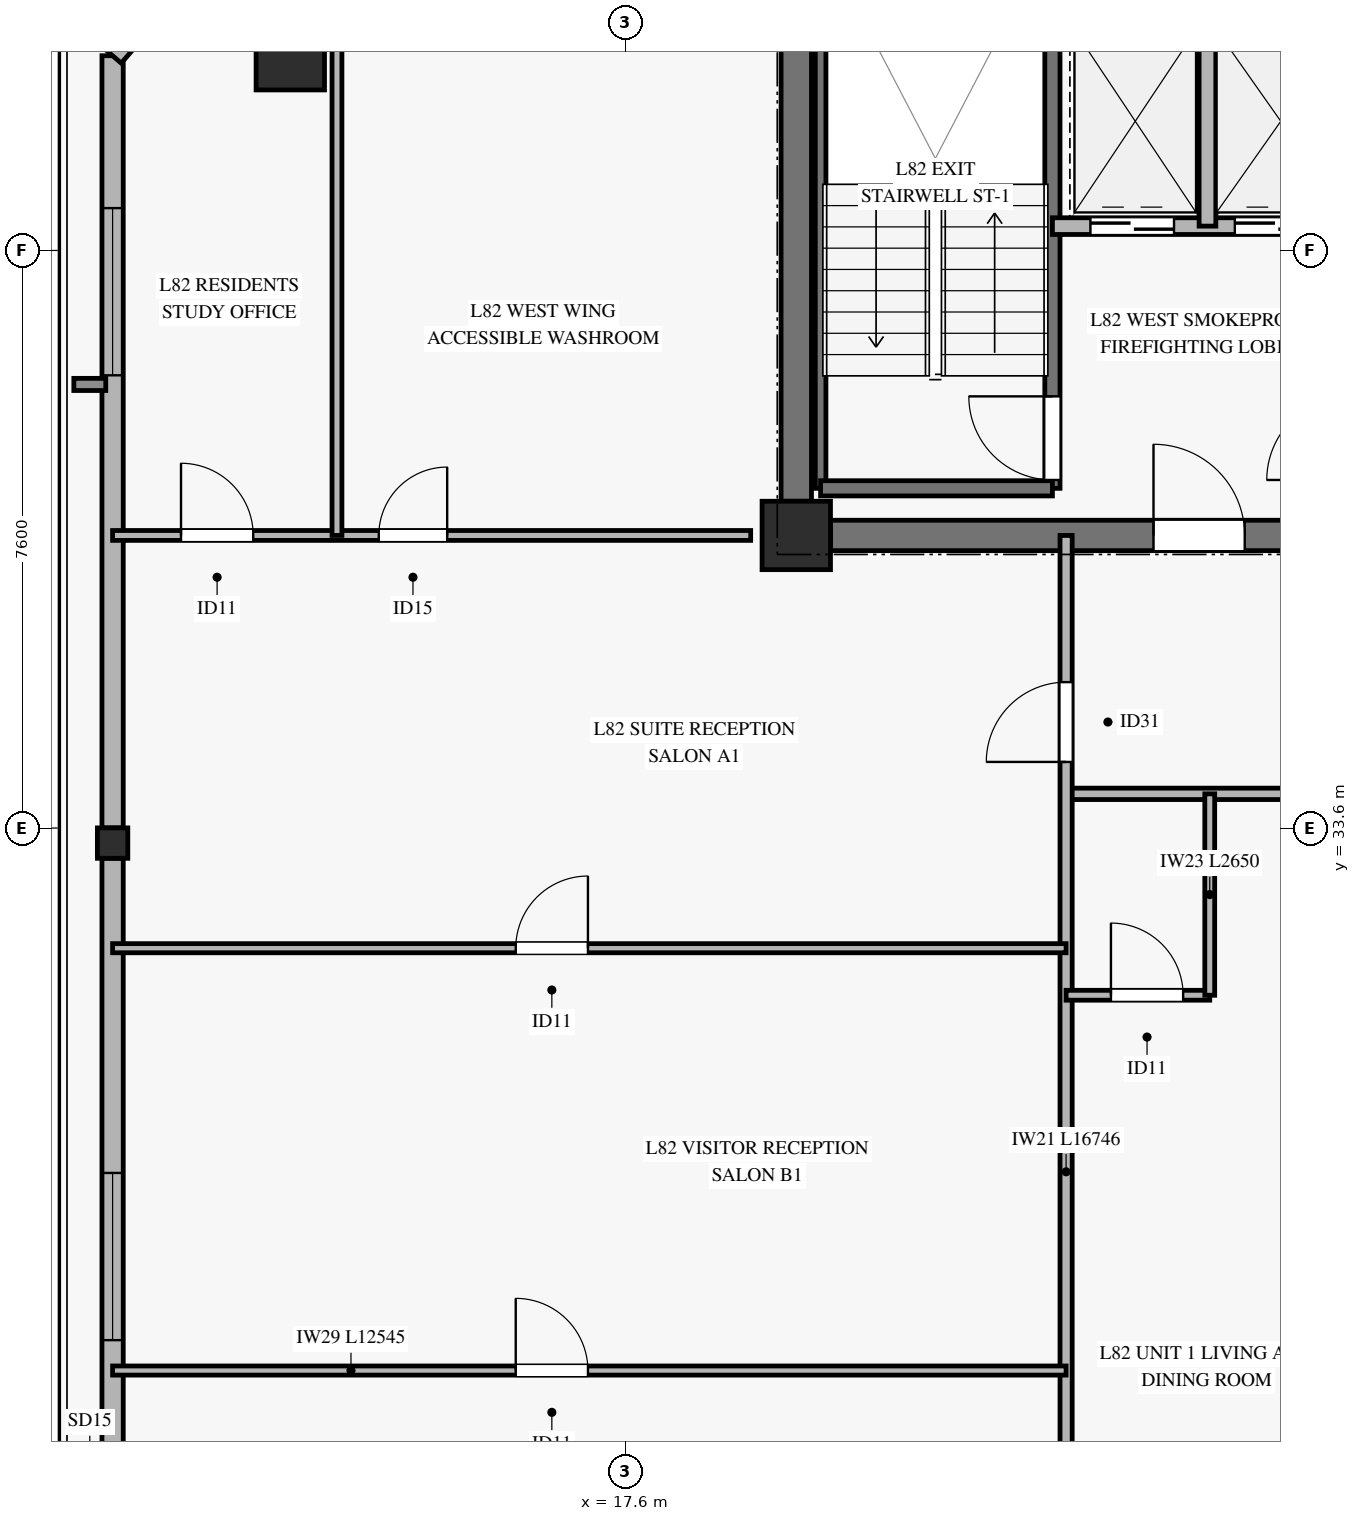
"""IFC4 building model, lengths in metres.
Left out: names, types, materials, properties, quantities, classifications, styles, units other than length and angle.
Written with IfcOpenShell. Run it as: python <this file> out.ifc"""

import sys

from ifc_helpers import new_model, si_unit, direction, frame, frame_2d, origin, origin_2d, place, context, subcontext, project, spatial, rectangle, hollow_rectangle, extrude, source, transform, mapped, element, fill, save


model = new_model("IFC4")
c1 = context("Model", 3, precision=1e-05, world=origin(), true_north=direction((0.0, 1.0)))
c2 = subcontext(c1, "Body", "Model", "MODEL_VIEW")
j1 = project(units=[si_unit("LENGTHUNIT", "METRE"), si_unit("PLANEANGLEUNIT", "RADIAN")], contexts=[c1])
p1 = place(None, origin())
s1 = spatial("IfcSite", under=j1, at=p1, CompositionType="ELEMENT")
p2 = place(p1, origin())
s2 = spatial("IfcBuilding", under=s1, at=p2, CompositionType="ELEMENT")
p3 = place(p2, frame((0.0, 0.0, 317.6)))
s3 = spatial("IfcBuildingStorey", under=s2, at=p3, CompositionType="ELEMENT", Elevation=317.6)
m1 = source(origin(), c2, "Body", "SweptSolid", [
    extrude(rectangle(XDim=0.9, YDim=0.9, at=origin_2d()), origin(), (0.0, 0.0, 1.0), 3.185),
])
p4 = place(p3, frame((19.85, 37.45, 0.0), z_axis=(0.0, 0.0, 1.0), x_axis=(1.0, 0.0, 0.0)))
e1 = element("IfcColumn", 1, at=p4, inside=s3, PredefinedType="PILASTER", context=c2, shape_type="MappedRepresentation", body=[
    mapped(m1, transform((0.0, 0.0, 0.0), x_axis=(1.0, 0.0, 0.0), y_axis=(0.0, 1.0, 0.0), z_axis=(0.0, 0.0, 1.0), scale=1.0)),
])
p5 = place(p3, frame((20.3, 37.45, 0.0), z_axis=(0.0, 0.0, 1.0), x_axis=(1.0, 0.0, 0.0)))
e2 = element("IfcWall", 2, at=p5, inside=s3, PredefinedType="SHEAR", context=c2, shape_type="SweptSolid", body=[
    extrude(rectangle(XDim=10.05, YDim=0.4, at=frame_2d((5.025, 0.0))), origin(), (0.0, 0.0, 1.0), 3.185),
])
p6 = place(p5, frame((4.25, 0.0, 0.0)))
e3 = element("IfcOpeningElement", 3, at=p6, cuts=e2, PredefinedType="OPENING", context=c2, shape_type="SweptSolid", body=[
    extrude(rectangle(XDim=1.2, YDim=2.15, at=frame_2d((0.6, 1.075))), frame((0.0, 0.21, 0.0), z_axis=(0.0, -1.0, 0.0), x_axis=(1.0, 0.0, 0.0)), (0.0, 0.0, 1.0), 0.42),
])
p7 = place(p3, frame((19.85, 37.9, 0.0), z_axis=(0.0, 0.0, 1.0), x_axis=(0.0, 1.0, 0.0)))
e4 = element("IfcWall", 4, at=p7, inside=s3, PredefinedType="SHEAR", context=c2, shape_type="SweptSolid", body=[
    extrude(rectangle(XDim=8.2, YDim=0.4, at=frame_2d((4.1, 0.0))), origin(), (0.0, 0.0, 1.0), 3.185),
])
m2 = source(origin(), c2, "Body", "SweptSolid", [
    extrude(hollow_rectangle(XDim=0.9, YDim=0.9, WallThickness=0.04, at=origin_2d()), origin(), (0.0, 0.0, 1.0), 3.185),
])
p8 = place(p3, frame((13.193, 43.762, 0.0), z_axis=(0.0, 0.0, 1.0), x_axis=(1.0, 0.0, 0.0)))
e5 = element("IfcColumn", 5, at=p8, inside=s3, PredefinedType="COLUMN", context=c2, shape_type="MappedRepresentation", body=[
    mapped(m2, transform((0.0, 0.0, 0.0), x_axis=(1.0, 0.0, 0.0), y_axis=(0.0, 1.0, 0.0), z_axis=(0.0, 0.0, 1.0), scale=1.0)),
])
m3 = source(origin(), c2, "Body", "SweptSolid", [
    extrude(hollow_rectangle(XDim=0.4, YDim=0.4, WallThickness=0.02, at=origin_2d()), origin(), (0.0, 0.0, 1.0), 3.185),
])
p9 = place(p3, frame((10.855, 33.402, 0.0), z_axis=(0.0, 0.0, 1.0), x_axis=(1.0, 0.0, 0.0)))
e6 = element("IfcColumn", 6, at=p9, inside=s3, PredefinedType="COLUMN", context=c2, shape_type="MappedRepresentation", body=[
    mapped(m3, transform((0.0, 0.0, 0.0), x_axis=(1.0, 0.0, 0.0), y_axis=(0.0, 1.0, 0.0), z_axis=(0.0, 0.0, 1.0), scale=1.0)),
])
p10 = place(p3, frame((10.855, 23.042, 0.0), z_axis=(0.0, 0.0, 1.0), x_axis=(0.0, 1.0, 0.0)))
e7 = element("IfcWall", 7, at=p10, inside=s3, PredefinedType="SOLIDWALL", context=c2, shape_type="SweptSolid", body=[
    extrude(rectangle(XDim=10.16, YDim=0.28, at=frame_2d((5.08, 0.0))), origin(), (0.0, 0.0, 1.0), 2.815),
])
p11 = place(p10, frame((3.82, 0.0, 0.45)))
e8 = element("IfcOpeningElement", 8, at=p11, cuts=e7, PredefinedType="OPENING", context=c2, shape_type="SweptSolid", body=[
    extrude(rectangle(XDim=2.2, YDim=2.1, at=frame_2d((1.1, 1.05))), frame((0.0, 0.15, 0.0), z_axis=(0.0, -1.0, 0.0), x_axis=(1.0, 0.0, 0.0)), (0.0, 0.0, 1.0), 0.3),
])
p12 = place(p3, frame((10.855, 33.602, 0.0), z_axis=(0.0, 0.0, 1.0), x_axis=(0.0, 1.0, 0.0)))
e9 = element("IfcWall", 9, at=p12, inside=s3, PredefinedType="SOLIDWALL", context=c2, shape_type="SweptSolid", body=[
    extrude(rectangle(XDim=10.16, YDim=0.28, at=frame_2d((5.08, 0.0))), origin(), (0.0, 0.0, 1.0), 2.815),
])
p13 = place(p12, frame((5.955, 0.0, 0.45)))
e10 = element("IfcOpeningElement", 10, at=p13, cuts=e9, PredefinedType="OPENING", context=c2, shape_type="SweptSolid", body=[
    extrude(rectangle(XDim=2.2, YDim=2.1, at=frame_2d((1.1, 1.05))), frame((0.0, 0.15, 0.0), z_axis=(0.0, -1.0, 0.0), x_axis=(1.0, 0.0, 0.0)), (0.0, 0.0, 1.0), 0.3),
])
p14 = place(p3, frame((12.993, 46.25, 0.0), z_axis=(0.0, 0.0, 1.0), x_axis=(-0.65172861611, -0.758452246977, 0.0)))
e11 = element("IfcWall", 11, at=p14, inside=s3, PredefinedType="SOLIDWALL", context=c2, shape_type="SweptSolid", body=[
    extrude(rectangle(XDim=3.281, YDim=0.3, at=frame_2d((1.64, 0.0))), origin(), (0.0, 0.0, 1.0), 2.815),
])
p15 = place(p14, frame((0.84, 0.0, 0.45)))
e12 = element("IfcOpeningElement", 12, at=p15, cuts=e11, PredefinedType="OPENING", context=c2, shape_type="SweptSolid", body=[
    extrude(rectangle(XDim=1.6, YDim=2.0, at=frame_2d((0.8, 1.0))), frame((0.0, 0.16, 0.0), z_axis=(0.0, -1.0, 0.0), x_axis=(1.0, 0.0, 0.0)), (0.0, 0.0, 1.0), 0.32),
])
p16 = place(p3, frame((20.17, 38.07, 0.0), z_axis=(0.0, 0.0, 1.0), x_axis=(0.0, 1.0, 0.0)))
e13 = element("IfcWall", 13, at=p16, inside=s3, PredefinedType="SOLIDWALL", context=c2, shape_type="SweptSolid", body=[
    extrude(rectangle(XDim=7.25, YDim=0.14, at=frame_2d((3.625, 0.0))), origin(), (0.0, 0.0, 1.0), 3.4),
])
p17 = place(p3, frame((23.22, 38.07, 0.0), z_axis=(0.0, 0.0, 1.0), x_axis=(0.0, 1.0, 0.0)))
e14 = element("IfcWall", 14, at=p17, inside=s3, PredefinedType="SOLIDWALL", context=c2, shape_type="SweptSolid", body=[
    extrude(rectangle(XDim=7.25, YDim=0.2, at=frame_2d((3.625, 0.0))), origin(), (0.0, 0.0, 1.0), 3.4),
])
p18 = place(p17, frame((0.11, 0.0, 0.0)))
e15 = element("IfcOpeningElement", 15, at=p18, cuts=e14, PredefinedType="OPENING", context=c2, shape_type="SweptSolid", body=[
    extrude(rectangle(XDim=1.1, YDim=2.15, at=frame_2d((0.55, 1.075))), frame((0.0, 0.11, 0.0), z_axis=(0.0, -1.0, 0.0), x_axis=(1.0, 0.0, 0.0)), (0.0, 0.0, 1.0), 0.22),
])
p19 = place(p3, frame((20.17, 38.07, 0.0), z_axis=(0.0, 0.0, 1.0), x_axis=(1.0, 0.0, 0.0)))
e16 = element("IfcWall", 16, at=p19, inside=s3, PredefinedType="SOLIDWALL", context=c2, shape_type="SweptSolid", body=[
    extrude(rectangle(XDim=3.05, YDim=0.2, at=frame_2d((1.525, 0.0))), origin(), (0.0, 0.0, 1.0), 3.4),
])
p20 = place(p3, frame((23.22, 41.52, 0.0), z_axis=(0.0, 0.0, 1.0), x_axis=(1.0, 0.0, 0.0)))
e17 = element("IfcWall", 17, at=p20, inside=s3, PredefinedType="SOLIDWALL", context=c2, shape_type="SweptSolid", body=[
    extrude(rectangle(XDim=3.92, YDim=0.22, at=frame_2d((1.96, 0.0))), origin(), (0.0, 0.0, 1.0), 3.185),
])
p21 = place(p20, frame((0.5, 0.0, 0.0)))
e18 = element("IfcOpeningElement", 18, at=p21, cuts=e17, PredefinedType="OPENING", context=c2, shape_type="SweptSolid", body=[
    extrude(rectangle(XDim=1.1, YDim=2.2, at=frame_2d((0.55, 1.1))), frame((0.0, 0.12, 0.0), z_axis=(0.0, -1.0, 0.0), x_axis=(1.0, 0.0, 0.0)), (0.0, 0.0, 1.0), 0.24),
])
p22 = place(p20, frame((2.4, 0.0, 0.0)))
e19 = element("IfcOpeningElement", 19, at=p22, cuts=e17, PredefinedType="OPENING", context=c2, shape_type="SweptSolid", body=[
    extrude(rectangle(XDim=1.1, YDim=2.2, at=frame_2d((0.55, 1.1))), frame((0.0, 0.12, 0.0), z_axis=(0.0, -1.0, 0.0), x_axis=(1.0, 0.0, 0.0)), (0.0, 0.0, 1.0), 0.24),
])
p23 = place(p3, frame((25.26, 41.52, 0.0), z_axis=(0.0, 0.0, 1.0), x_axis=(0.0, 1.0, 0.0)))
e20 = element("IfcWall", 20, at=p23, inside=s3, PredefinedType="SOLIDWALL", context=c2, shape_type="SweptSolid", body=[
    extrude(rectangle(XDim=2.8, YDim=0.22, at=frame_2d((1.4, 0.0))), origin(), (0.0, 0.0, 1.0), 3.185),
])
p24 = place(p3, frame((23.4, 34.05, 0.0), z_axis=(0.0, 0.0, 1.0), x_axis=(1.0, 0.0, 0.0)))
e21 = element("IfcWall", 21, at=p24, inside=s3, PredefinedType="PARTITIONING", context=c2, shape_type="SweptSolid", body=[
    extrude(rectangle(XDim=20.9, YDim=0.15, at=frame_2d((10.45, 0.0))), origin(), (0.0, 0.0, 1.0), 2.47),
])
p25 = place(p24, frame((3.275, 0.0, 0.0)))
e22 = element("IfcOpeningElement", 22, at=p25, cuts=e21, PredefinedType="OPENING", context=c2, shape_type="SweptSolid", body=[
    extrude(rectangle(XDim=1.05, YDim=2.15, at=frame_2d((0.525, 1.075))), frame((0.0, 0.085, 0.0), z_axis=(0.0, -1.0, 0.0), x_axis=(1.0, 0.0, 0.0)), (0.0, 0.0, 1.0), 0.17),
])
p26 = place(p24, frame((10.775, 0.0, 0.0)))
e23 = element("IfcOpeningElement", 23, at=p26, cuts=e21, PredefinedType="OPENING", context=c2, shape_type="SweptSolid", body=[
    extrude(rectangle(XDim=1.05, YDim=2.15, at=frame_2d((0.525, 1.075))), frame((0.0, 0.085, 0.0), z_axis=(0.0, -1.0, 0.0), x_axis=(1.0, 0.0, 0.0)), (0.0, 0.0, 1.0), 0.17),
])
p27 = place(p24, frame((17.525, 0.0, 0.0)))
e24 = element("IfcOpeningElement", 24, at=p27, cuts=e21, PredefinedType="OPENING", context=c2, shape_type="SweptSolid", body=[
    extrude(rectangle(XDim=1.05, YDim=2.15, at=frame_2d((0.525, 1.075))), frame((0.0, 0.085, 0.0), z_axis=(0.0, -1.0, 0.0), x_axis=(1.0, 0.0, 0.0)), (0.0, 0.0, 1.0), 0.17),
])
p28 = place(p3, frame((23.4, 20.704, 0.0), z_axis=(0.0, 0.0, 1.0), x_axis=(0.0, 1.0, 0.0)))
e25 = element("IfcWall", 25, at=p28, inside=s3, PredefinedType="PARTITIONING", context=c2, shape_type="SweptSolid", body=[
    extrude(rectangle(XDim=16.746, YDim=0.16, at=frame_2d((8.373, 0.0))), origin(), (0.0, 0.0, 1.0), 2.77),
])
p29 = place(p28, frame((13.766, 0.0, 0.0)))
e26 = element("IfcOpeningElement", 26, at=p29, cuts=e25, PredefinedType="OPENING", context=c2, shape_type="SweptSolid", body=[
    extrude(rectangle(XDim=1.05, YDim=2.15, at=frame_2d((0.525, 1.075))), frame((0.0, 0.09, 0.0), z_axis=(0.0, -1.0, 0.0), x_axis=(1.0, 0.0, 0.0)), (0.0, 0.0, 1.0), 0.18),
])
p30 = place(p3, frame((10.855, 26.462, 0.0), z_axis=(0.0, 0.0, 1.0), x_axis=(1.0, 0.0, 0.0)))
e27 = element("IfcWall", 27, at=p30, inside=s3, PredefinedType="PARTITIONING", context=c2, shape_type="SweptSolid", body=[
    extrude(rectangle(XDim=12.545, YDim=0.12, at=frame_2d((6.272, 0.0))), origin(), (0.0, 0.0, 1.0), 2.47),
])
p31 = place(p30, frame((5.304, 0.0, 0.0)))
e28 = element("IfcOpeningElement", 28, at=p31, cuts=e27, PredefinedType="OPENING", context=c2, shape_type="SweptSolid", body=[
    extrude(rectangle(XDim=0.95, YDim=2.1, at=frame_2d((0.475, 1.05))), frame((0.0, 0.07, 0.0), z_axis=(0.0, -1.0, 0.0), x_axis=(1.0, 0.0, 0.0)), (0.0, 0.0, 1.0), 0.14),
])
p32 = place(p3, frame((10.855, 32.019, 0.0), z_axis=(0.0, 0.0, 1.0), x_axis=(1.0, 0.0, 0.0)))
e29 = element("IfcWall", 29, at=p32, inside=s3, PredefinedType="PARTITIONING", context=c2, shape_type="SweptSolid", body=[
    extrude(rectangle(XDim=12.545, YDim=0.12, at=frame_2d((6.272, 0.0))), origin(), (0.0, 0.0, 1.0), 2.47),
])
p33 = place(p32, frame((5.304, 0.0, 0.0)))
e30 = element("IfcOpeningElement", 30, at=p33, cuts=e29, PredefinedType="OPENING", context=c2, shape_type="SweptSolid", body=[
    extrude(rectangle(XDim=0.95, YDim=2.1, at=frame_2d((0.475, 1.05))), frame((0.0, 0.07, 0.0), z_axis=(0.0, -1.0, 0.0), x_axis=(1.0, 0.0, 0.0)), (0.0, 0.0, 1.0), 0.14),
])
p34 = place(p3, frame((23.4, 31.4, 0.0), z_axis=(0.0, 0.0, 1.0), x_axis=(1.0, 0.0, 0.0)))
e31 = element("IfcWall", 31, at=p34, inside=s3, PredefinedType="PARTITIONING", context=c2, shape_type="SweptSolid", body=[
    extrude(rectangle(XDim=1.89, YDim=0.13, at=frame_2d((0.945, 0.0))), origin(), (0.0, 0.0, 1.0), 3.185),
])
p35 = place(p34, frame((0.59, 0.0, 0.0)))
e32 = element("IfcOpeningElement", 32, at=p35, cuts=e31, PredefinedType="OPENING", context=c2, shape_type="SweptSolid", body=[
    extrude(rectangle(XDim=0.95, YDim=2.1, at=frame_2d((0.475, 1.05))), frame((0.0, 0.075, 0.0), z_axis=(0.0, -1.0, 0.0), x_axis=(1.0, 0.0, 0.0)), (0.0, 0.0, 1.0), 0.15),
])
p36 = place(p3, frame((25.29, 31.4, 0.0), z_axis=(0.0, 0.0, 1.0), x_axis=(0.0, 1.0, 0.0)))
e33 = element("IfcWall", 33, at=p36, inside=s3, PredefinedType="PARTITIONING", context=c2, shape_type="SweptSolid", body=[
    extrude(rectangle(XDim=2.65, YDim=0.13, at=frame_2d((1.325, 0.0))), origin(), (0.0, 0.0, 1.0), 2.77),
])
p37 = place(p3, frame((10.855, 37.45, 0.0), z_axis=(0.0, 0.0, 1.0), x_axis=(1.0, 0.0, 0.0)))
e34 = element("IfcWall", 34, at=p37, inside=s3, PredefinedType="PARTITIONING", context=c2, shape_type="SweptSolid", body=[
    extrude(rectangle(XDim=8.395, YDim=0.13, at=frame_2d((4.198, 0.0))), origin(), (0.0, 0.0, 1.0), 2.82),
])
p38 = place(p37, frame((0.9, 0.0, 0.0)))
e35 = element("IfcOpeningElement", 35, at=p38, cuts=e34, PredefinedType="OPENING", context=c2, shape_type="SweptSolid", body=[
    extrude(rectangle(XDim=0.95, YDim=2.1, at=frame_2d((0.475, 1.05))), frame((0.0, 0.075, 0.0), z_axis=(0.0, -1.0, 0.0), x_axis=(1.0, 0.0, 0.0)), (0.0, 0.0, 1.0), 0.15),
])
p39 = place(p37, frame((3.502, 0.0, 0.0)))
e36 = element("IfcOpeningElement", 36, at=p39, cuts=e34, PredefinedType="OPENING", context=c2, shape_type="SweptSolid", body=[
    extrude(rectangle(XDim=0.9, YDim=2.1, at=frame_2d((0.45, 1.05))), frame((0.0, 0.075, 0.0), z_axis=(0.0, -1.0, 0.0), x_axis=(1.0, 0.0, 0.0)), (0.0, 0.0, 1.0), 0.15),
])
p40 = place(p3, frame((13.807, 37.45, 0.0), z_axis=(0.0, 0.0, 1.0), x_axis=(0.0, 1.0, 0.0)))
e37 = element("IfcWall", 37, at=p40, inside=s3, PredefinedType="PARTITIONING", context=c2, shape_type="SweptSolid", body=[
    extrude(rectangle(XDim=8.8, YDim=0.13, at=frame_2d((4.4, 0.0))), origin(), (0.0, 0.0, 1.0), 3.185),
])
m4 = source(origin(), c2, "Body", "SweptSolid", [
    extrude(rectangle(XDim=2.2, YDim=2.1, at=frame_2d((1.1, 1.05))), frame((0.0, 0.03, 0.0), z_axis=(0.0, -1.0, 0.0), x_axis=(1.0, 0.0, 0.0)), (0.0, 0.0, 1.0), 0.06),
])
p41 = place(p11, origin())
e38 = element("IfcWindow", 38, at=p41, inside=s3, PartitioningType="SINGLE_PANEL", PredefinedType="WINDOW", context=c2, shape_type="MappedRepresentation", body=[
    mapped(m4, transform((0.0, 0.0, 0.0), x_axis=(1.0, 0.0, 0.0), y_axis=(0.0, 1.0, 0.0), z_axis=(0.0, 0.0, 1.0), scale=1.0)),
])
fill(e8, e38)
p42 = place(p13, origin())
e39 = element("IfcWindow", 39, at=p42, inside=s3, PartitioningType="SINGLE_PANEL", PredefinedType="WINDOW", context=c2, shape_type="MappedRepresentation", body=[
    mapped(m4, transform((0.0, 0.0, 0.0), x_axis=(1.0, 0.0, 0.0), y_axis=(0.0, 1.0, 0.0), z_axis=(0.0, 0.0, 1.0), scale=1.0)),
])
fill(e10, e39)
m5 = source(origin(), c2, "Body", "SweptSolid", [
    extrude(rectangle(XDim=1.1, YDim=2.15, at=frame_2d((0.55, 1.075))), frame((0.0, 0.025, 0.0), z_axis=(0.0, -1.0, 0.0), x_axis=(1.0, 0.0, 0.0)), (0.0, 0.0, 1.0), 0.05),
])
p43 = place(p18, origin())
e40 = element("IfcDoor", 40, at=p43, inside=s3, OperationType="SINGLE_SWING_RIGHT", PredefinedType="DOOR", context=c2, shape_type="MappedRepresentation", body=[
    mapped(m5, transform((0.0, 0.0, 0.0), x_axis=(1.0, 0.0, 0.0), y_axis=(0.0, 1.0, 0.0), z_axis=(0.0, 0.0, 1.0), scale=1.0)),
])
fill(e15, e40)
m6 = source(origin(), c2, "Body", "SweptSolid", [
    extrude(rectangle(XDim=1.1, YDim=2.2, at=frame_2d((0.55, 1.1))), frame((0.0, 0.025, 0.0), z_axis=(0.0, -1.0, 0.0), x_axis=(1.0, 0.0, 0.0)), (0.0, 0.0, 1.0), 0.05),
])
p44 = place(p21, origin())
e41 = element("IfcDoor", 41, at=p44, inside=s3, OperationType="SLIDING_TO_LEFT", PredefinedType="DOOR", context=c2, shape_type="MappedRepresentation", body=[
    mapped(m6, transform((0.0, 0.0, 0.0), x_axis=(1.0, 0.0, 0.0), y_axis=(0.0, 1.0, 0.0), z_axis=(0.0, 0.0, 1.0), scale=1.0)),
])
fill(e18, e41)
p45 = place(p22, origin())
e42 = element("IfcDoor", 42, at=p45, inside=s3, OperationType="SLIDING_TO_LEFT", PredefinedType="DOOR", context=c2, shape_type="MappedRepresentation", body=[
    mapped(m6, transform((0.0, 0.0, 0.0), x_axis=(1.0, 0.0, 0.0), y_axis=(0.0, 1.0, 0.0), z_axis=(0.0, 0.0, 1.0), scale=1.0)),
])
fill(e19, e42)
m7 = source(origin(), c2, "Body", "SweptSolid", [
    extrude(rectangle(XDim=1.2, YDim=2.15, at=frame_2d((0.6, 1.075))), frame((0.0, 0.025, 0.0), z_axis=(0.0, -1.0, 0.0), x_axis=(1.0, 0.0, 0.0)), (0.0, 0.0, 1.0), 0.05),
])
p46 = place(p6, origin())
e43 = element("IfcDoor", 43, at=p46, inside=s3, OperationType="SINGLE_SWING_LEFT", PredefinedType="DOOR", context=c2, shape_type="MappedRepresentation", body=[
    mapped(m7, transform((0.0, 0.0, 0.0), x_axis=(1.0, 0.0, 0.0), y_axis=(0.0, 1.0, 0.0), z_axis=(0.0, 0.0, 1.0), scale=1.0)),
])
fill(e3, e43)
m8 = source(origin(), c2, "Body", "SweptSolid", [
    extrude(rectangle(XDim=1.05, YDim=2.15, at=frame_2d((0.525, 1.075))), frame((0.0, 0.025, 0.0), z_axis=(0.0, -1.0, 0.0), x_axis=(1.0, 0.0, 0.0)), (0.0, 0.0, 1.0), 0.05),
])
p47 = place(p29, origin())
e44 = element("IfcDoor", 44, at=p47, inside=s3, OperationType="SINGLE_SWING_LEFT", PredefinedType="DOOR", context=c2, shape_type="MappedRepresentation", body=[
    mapped(m8, transform((0.0, 0.0, 0.0), x_axis=(1.0, 0.0, 0.0), y_axis=(0.0, 1.0, 0.0), z_axis=(0.0, 0.0, 1.0), scale=1.0)),
])
fill(e26, e44)
m9 = source(origin(), c2, "Body", "SweptSolid", [
    extrude(rectangle(XDim=0.95, YDim=2.1, at=frame_2d((0.475, 1.05))), frame((0.0, 0.025, 0.0), z_axis=(0.0, -1.0, 0.0), x_axis=(1.0, 0.0, 0.0)), (0.0, 0.0, 1.0), 0.05),
])
p48 = place(p33, origin())
e45 = element("IfcDoor", 45, at=p48, inside=s3, OperationType="SINGLE_SWING_RIGHT", PredefinedType="DOOR", context=c2, shape_type="MappedRepresentation", body=[
    mapped(m9, transform((0.0, 0.0, 0.0), x_axis=(1.0, 0.0, 0.0), y_axis=(0.0, 1.0, 0.0), z_axis=(0.0, 0.0, 1.0), scale=1.0)),
])
fill(e30, e45)
p49 = place(p31, origin())
e46 = element("IfcDoor", 46, at=p49, inside=s3, OperationType="SINGLE_SWING_LEFT", PredefinedType="DOOR", context=c2, shape_type="MappedRepresentation", body=[
    mapped(m9, transform((0.0, 0.0, 0.0), x_axis=(1.0, 0.0, 0.0), y_axis=(0.0, 1.0, 0.0), z_axis=(0.0, 0.0, 1.0), scale=1.0)),
])
fill(e28, e46)
p50 = place(p35, origin())
e47 = element("IfcDoor", 47, at=p50, inside=s3, OperationType="SINGLE_SWING_LEFT", PredefinedType="DOOR", context=c2, shape_type="MappedRepresentation", body=[
    mapped(m9, transform((0.0, 0.0, 0.0), x_axis=(1.0, 0.0, 0.0), y_axis=(0.0, 1.0, 0.0), z_axis=(0.0, 0.0, 1.0), scale=1.0)),
])
fill(e32, e47)
p51 = place(p38, origin())
e48 = element("IfcDoor", 48, at=p51, inside=s3, OperationType="SINGLE_SWING_LEFT", PredefinedType="DOOR", context=c2, shape_type="MappedRepresentation", body=[
    mapped(m9, transform((0.0, 0.0, 0.0), x_axis=(1.0, 0.0, 0.0), y_axis=(0.0, 1.0, 0.0), z_axis=(0.0, 0.0, 1.0), scale=1.0)),
])
fill(e35, e48)
m10 = source(origin(), c2, "Body", "SweptSolid", [
    extrude(rectangle(XDim=0.9, YDim=2.1, at=frame_2d((0.45, 1.05))), frame((0.0, 0.025, 0.0), z_axis=(0.0, -1.0, 0.0), x_axis=(1.0, 0.0, 0.0)), (0.0, 0.0, 1.0), 0.05),
])
p52 = place(p39, origin())
e49 = element("IfcDoor", 49, at=p52, inside=s3, OperationType="SINGLE_SWING_RIGHT", PredefinedType="DOOR", context=c2, shape_type="MappedRepresentation", body=[
    mapped(m10, transform((0.0, 0.0, 0.0), x_axis=(1.0, 0.0, 0.0), y_axis=(0.0, 1.0, 0.0), z_axis=(0.0, 0.0, 1.0), scale=1.0)),
])
fill(e36, e49)
save(model, sys.argv[1])
